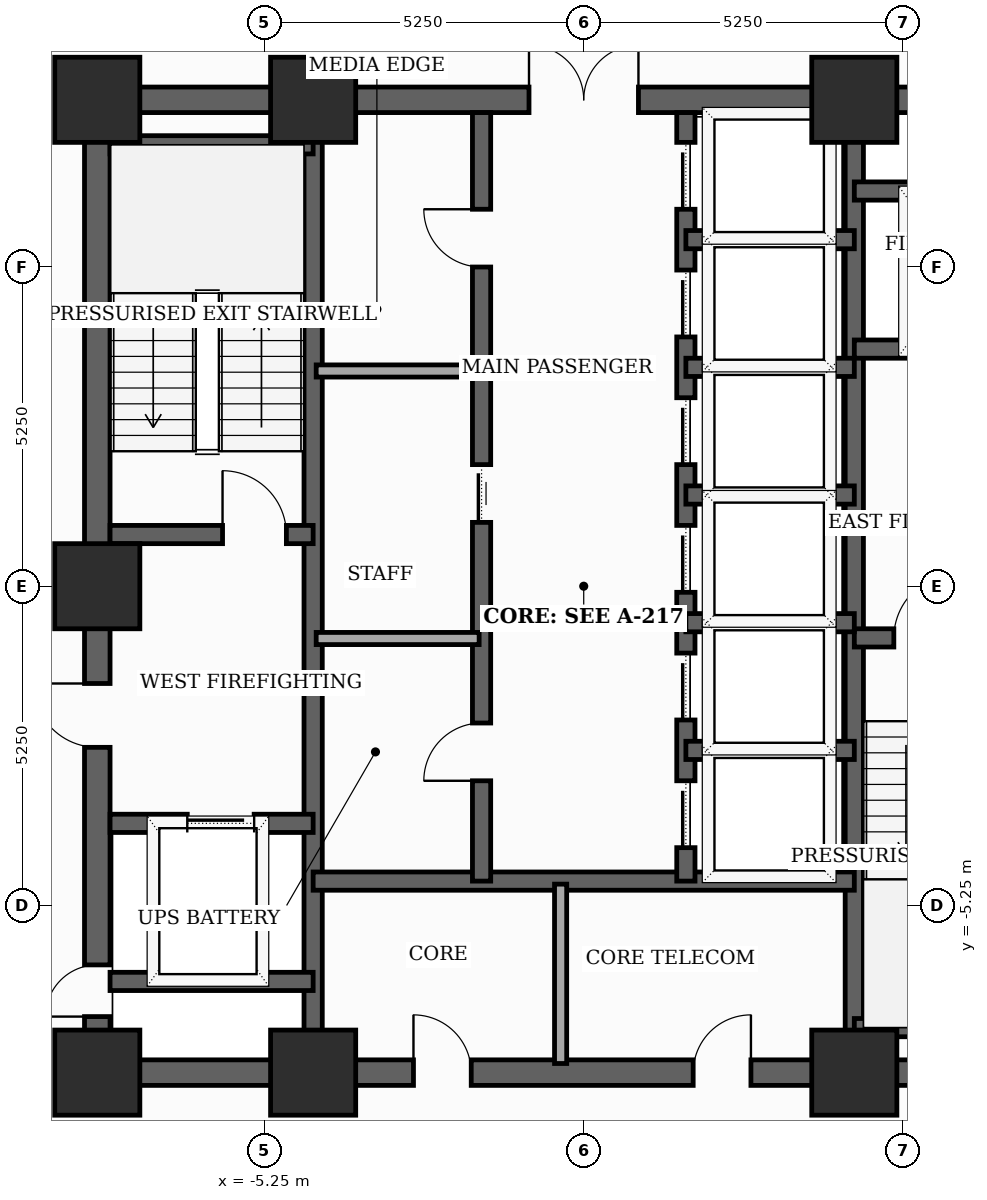
"""IFC4 building model, lengths in metres.
Left out: names, types, materials, properties, quantities, classifications, styles, units other than length and angle.
Written with IfcOpenShell. Run it as: python <this file> out.ifc"""

import sys

from ifc_helpers import new_model, si_unit, direction, frame, frame_2d, origin, origin_2d, place, context, subcontext, project, spatial, rectangle, extrude, element, fill, save


model = new_model("IFC4")
c1 = context("Model", 3, precision=1e-05, world=origin(), true_north=direction((0.0, 1.0)))
c2 = subcontext(c1, "Body", "Model", "MODEL_VIEW")
j1 = project(units=[si_unit("LENGTHUNIT", "METRE"), si_unit("PLANEANGLEUNIT", "RADIAN")], contexts=[c1])
p1 = place(None, origin())
s1 = spatial("IfcSite", under=j1, at=p1, CompositionType="ELEMENT")
p2 = place(p1, origin())
s2 = spatial("IfcBuilding", under=s1, at=p2, CompositionType="ELEMENT")
p3 = place(p2, frame((0.0, 0.0, 127.3)))
s3 = spatial("IfcBuildingStorey", under=s2, at=p3, CompositionType="ELEMENT", Elevation=127.3)
for number, where, z_axis, x_axis in (
    (1, (-8.0, -8.0, 0.0), (0.0, 0.0, 1.0), (1.0, 0.0, 0.0)),
    (2, (-4.45, -8.0, 0.0), (0.0, 0.0, 1.0), (1.0, 0.0, 0.0)),
    (3, (4.45, -8.0, 0.0), (0.0, 0.0, 1.0), (1.0, 0.0, 0.0)),
    (4, (4.45, 8.0, 0.0), (0.0, 0.0, 1.0), (1.0, 0.0, 0.0)),
    (5, (-4.45, 8.0, 0.0), (0.0, 0.0, 1.0), (1.0, 0.0, 0.0)),
    (6, (-8.0, 8.0, 0.0), (0.0, 0.0, 1.0), (1.0, 0.0, 0.0)),
    (7, (-8.0, 0.0, 0.0), (0.0, 0.0, 1.0), (1.0, 0.0, 0.0)),
):
    element("IfcColumn", number, at=place(p3, frame(where, z_axis=z_axis, x_axis=x_axis)), inside=s3, PredefinedType="COLUMN", context=c2, shape_type="SweptSolid", body=[
        extrude(rectangle(XDim=1.4, YDim=1.4, at=origin_2d()), origin(), (0.0, 0.0, 1.0), 3.7),
    ])
p4 = place(p3, frame((-8.0, -8.0, 0.0), z_axis=(0.0, 0.0, 1.0), x_axis=(0.0, 1.0, 0.0)))
e8 = element("IfcWall", 8, at=p4, inside=s3, PredefinedType="SHEAR", context=c2, shape_type="SweptSolid", body=[
    extrude(rectangle(XDim=16.0, YDim=0.42, at=frame_2d((8.0, 0.0))), origin(), (0.0, 0.0, 1.0), 3.5),
])
p5 = place(p4, frame((0.922, 0.0, 0.0)))
e9 = element("IfcOpeningElement", 9, at=p5, cuts=e8, PredefinedType="OPENING", context=c2, shape_type="SweptSolid", body=[
    extrude(rectangle(XDim=0.85, YDim=2.02, at=frame_2d((0.425, 1.01))), frame((0.0, 0.22, 0.0), z_axis=(0.0, -1.0, 0.0), x_axis=(1.0, 0.0, 0.0)), (0.0, 0.0, 1.0), 0.44),
])
p6 = place(p4, frame((5.35, 0.0, 0.0)))
e10 = element("IfcOpeningElement", 10, at=p6, cuts=e8, PredefinedType="OPENING", context=c2, shape_type="SweptSolid", body=[
    extrude(rectangle(XDim=1.05, YDim=2.15, at=frame_2d((0.525, 1.075))), frame((0.0, 0.22, 0.0), z_axis=(0.0, -1.0, 0.0), x_axis=(1.0, 0.0, 0.0)), (0.0, 0.0, 1.0), 0.44),
])
p7 = place(p3, frame((-8.0, -8.0, 0.0), z_axis=(0.0, 0.0, 1.0), x_axis=(1.0, 0.0, 0.0)))
e11 = element("IfcWall", 11, at=p7, inside=s3, PredefinedType="SHEAR", context=c2, shape_type="SweptSolid", body=[
    extrude(rectangle(XDim=16.0, YDim=0.42, at=frame_2d((8.0, 0.0))), origin(), (0.0, 0.0, 1.0), 3.5),
])
p8 = place(p7, frame((5.2, 0.0, 0.0)))
e12 = element("IfcOpeningElement", 12, at=p8, cuts=e11, PredefinedType="OPENING", context=c2, shape_type="SweptSolid", body=[
    extrude(rectangle(XDim=0.95, YDim=2.1, at=frame_2d((0.475, 1.05))), frame((0.0, 0.22, 0.0), z_axis=(0.0, -1.0, 0.0), x_axis=(1.0, 0.0, 0.0)), (0.0, 0.0, 1.0), 0.44),
])
p9 = place(p7, frame((9.8, 0.0, 0.0)))
e13 = element("IfcOpeningElement", 13, at=p9, cuts=e11, PredefinedType="OPENING", context=c2, shape_type="SweptSolid", body=[
    extrude(rectangle(XDim=0.95, YDim=2.1, at=frame_2d((0.475, 1.05))), frame((0.0, 0.22, 0.0), z_axis=(0.0, -1.0, 0.0), x_axis=(1.0, 0.0, 0.0)), (0.0, 0.0, 1.0), 0.44),
])
p10 = place(p3, frame((-8.0, 8.0, 0.0), z_axis=(0.0, 0.0, 1.0), x_axis=(1.0, 0.0, 0.0)))
e14 = element("IfcWall", 14, at=p10, inside=s3, PredefinedType="SHEAR", context=c2, shape_type="SweptSolid", body=[
    extrude(rectangle(XDim=16.0, YDim=0.42, at=frame_2d((8.0, 0.0))), origin(), (0.0, 0.0, 1.0), 3.5),
])
p11 = place(p10, frame((7.1, 0.0, 0.0)))
e15 = element("IfcOpeningElement", 15, at=p11, cuts=e14, PredefinedType="OPENING", context=c2, shape_type="SweptSolid", body=[
    extrude(rectangle(XDim=1.8, YDim=2.15, at=frame_2d((0.9, 1.075))), frame((0.0, 0.22, 0.0), z_axis=(0.0, -1.0, 0.0), x_axis=(1.0, 0.0, 0.0)), (0.0, 0.0, 1.0), 0.44),
])
for number, where, z_axis, x_axis in (
    (16, (-4.45, -7.79, 0.0), (0.0, 0.0, 1.0), (0.0, 1.0, 0.0)),
    (17, (4.45, -7.79, 0.0), (0.0, 0.0, 1.0), (0.0, 1.0, 0.0)),
):
    element("IfcWall", number, at=place(p3, frame(where, z_axis=z_axis, x_axis=x_axis)), inside=s3, PredefinedType="SHEAR", context=c2, shape_type="SweptSolid", body=[
        extrude(rectangle(XDim=15.58, YDim=0.3, at=frame_2d((7.79, 0.0))), origin(), (0.0, 0.0, 1.0), 3.5),
    ])
p12 = place(p3, frame((-7.79, 0.85, 0.0), z_axis=(0.0, 0.0, 1.0), x_axis=(1.0, 0.0, 0.0)))
e18 = element("IfcWall", 18, at=p12, inside=s3, PredefinedType="SHEAR", context=c2, shape_type="SweptSolid", body=[
    extrude(rectangle(XDim=3.34, YDim=0.3, at=frame_2d((1.67, 0.0))), origin(), (0.0, 0.0, 1.0), 3.5),
])
p13 = place(p12, frame((1.85, 0.0, 0.0)))
e19 = element("IfcOpeningElement", 19, at=p13, cuts=e18, PredefinedType="OPENING", context=c2, shape_type="SweptSolid", body=[
    extrude(rectangle(XDim=1.05, YDim=2.15, at=frame_2d((0.525, 1.075))), frame((0.0, 0.16, 0.0), z_axis=(0.0, -1.0, 0.0), x_axis=(1.0, 0.0, 0.0)), (0.0, 0.0, 1.0), 0.32),
])
p14 = place(p3, frame((-7.79, 7.26, 0.0), z_axis=(0.0, 0.0, 1.0), x_axis=(1.0, 0.0, 0.0)))
e20 = element("IfcWall", 20, at=p14, inside=s3, PredefinedType="SHEAR", context=c2, shape_type="SweptSolid", body=[
    extrude(rectangle(XDim=3.34, YDim=0.3, at=frame_2d((1.67, 0.0))), origin(), (0.0, 0.0, 1.0), 3.5),
])
p15 = place(p3, frame((4.45, -0.85, 0.0), z_axis=(0.0, 0.0, 1.0), x_axis=(1.0, 0.0, 0.0)))
e21 = element("IfcWall", 21, at=p15, inside=s3, PredefinedType="SHEAR", context=c2, shape_type="SweptSolid", body=[
    extrude(rectangle(XDim=3.34, YDim=0.3, at=frame_2d((1.67, 0.0))), origin(), (0.0, 0.0, 1.0), 3.5),
])
p16 = place(p15, frame((0.65, 0.0, 0.0)))
e22 = element("IfcOpeningElement", 22, at=p16, cuts=e21, PredefinedType="OPENING", context=c2, shape_type="SweptSolid", body=[
    extrude(rectangle(XDim=1.05, YDim=2.15, at=frame_2d((0.525, 1.075))), frame((0.0, 0.16, 0.0), z_axis=(0.0, -1.0, 0.0), x_axis=(1.0, 0.0, 0.0)), (0.0, 0.0, 1.0), 0.32),
])
p17 = place(p3, frame((4.45, -7.26, 0.0), z_axis=(0.0, 0.0, 1.0), x_axis=(1.0, 0.0, 0.0)))
e23 = element("IfcWall", 23, at=p17, inside=s3, PredefinedType="SHEAR", context=c2, shape_type="SweptSolid", body=[
    extrude(rectangle(XDim=3.55, YDim=0.3, at=frame_2d((1.775, 0.0))), origin(), (0.0, 0.0, 1.0), 3.5),
])
p18 = place(p3, frame((-7.79, -3.9, 0.0), z_axis=(0.0, 0.0, 1.0), x_axis=(1.0, 0.0, 0.0)))
e24 = element("IfcWall", 24, at=p18, inside=s3, PredefinedType="SHEAR", context=c2, shape_type="SweptSolid", body=[
    extrude(rectangle(XDim=3.34, YDim=0.3, at=frame_2d((1.67, 0.0))), origin(), (0.0, 0.0, 1.0), 3.5),
])
p19 = place(p18, frame((1.27, 0.0, 0.0)))
e25 = element("IfcOpeningElement", 25, at=p19, cuts=e24, PredefinedType="OPENING", context=c2, shape_type="SweptSolid", body=[
    extrude(rectangle(XDim=1.1, YDim=2.1, at=frame_2d((0.55, 1.05))), frame((0.0, 0.16, 0.0), z_axis=(0.0, -1.0, 0.0), x_axis=(1.0, 0.0, 0.0)), (0.0, 0.0, 1.0), 0.32),
])
p20 = place(p3, frame((-7.79, -6.5, 0.0), z_axis=(0.0, 0.0, 1.0), x_axis=(1.0, 0.0, 0.0)))
e26 = element("IfcWall", 26, at=p20, inside=s3, PredefinedType="SHEAR", context=c2, shape_type="SweptSolid", body=[
    extrude(rectangle(XDim=3.34, YDim=0.3, at=frame_2d((1.67, 0.0))), origin(), (0.0, 0.0, 1.0), 3.5),
])
p21 = place(p3, frame((4.45, 3.9, 0.0), z_axis=(0.0, 0.0, 1.0), x_axis=(1.0, 0.0, 0.0)))
e27 = element("IfcWall", 27, at=p21, inside=s3, PredefinedType="SHEAR", context=c2, shape_type="SweptSolid", body=[
    extrude(rectangle(XDim=3.34, YDim=0.3, at=frame_2d((1.67, 0.0))), origin(), (0.0, 0.0, 1.0), 3.5),
])
p22 = place(p21, frame((1.18, 0.0, 0.0)))
e28 = element("IfcOpeningElement", 28, at=p22, cuts=e27, PredefinedType="OPENING", context=c2, shape_type="SweptSolid", body=[
    extrude(rectangle(XDim=1.1, YDim=2.1, at=frame_2d((0.55, 1.05))), frame((0.0, 0.16, 0.0), z_axis=(0.0, -1.0, 0.0), x_axis=(1.0, 0.0, 0.0)), (0.0, 0.0, 1.0), 0.32),
])
p23 = place(p3, frame((4.45, 6.5, 0.0), z_axis=(0.0, 0.0, 1.0), x_axis=(1.0, 0.0, 0.0)))
e29 = element("IfcWall", 29, at=p23, inside=s3, PredefinedType="SHEAR", context=c2, shape_type="SweptSolid", body=[
    extrude(rectangle(XDim=3.34, YDim=0.3, at=frame_2d((1.67, 0.0))), origin(), (0.0, 0.0, 1.0), 3.5),
])
p24 = place(p3, frame((-4.45, -4.85, 0.0), z_axis=(0.0, 0.0, 1.0), x_axis=(1.0, 0.0, 0.0)))
e30 = element("IfcWall", 30, at=p24, inside=s3, PredefinedType="SHEAR", context=c2, shape_type="SweptSolid", body=[
    extrude(rectangle(XDim=8.9, YDim=0.3, at=frame_2d((4.45, 0.0))), origin(), (0.0, 0.0, 1.0), 3.5),
])
p25 = place(p3, frame((-1.68, -4.85, 0.0), z_axis=(0.0, 0.0, 1.0), x_axis=(0.0, 1.0, 0.0)))
e31 = element("IfcWall", 31, at=p25, inside=s3, PredefinedType="SHEAR", context=c2, shape_type="SweptSolid", body=[
    extrude(rectangle(XDim=12.64, YDim=0.3, at=frame_2d((6.32, 0.0))), origin(), (0.0, 0.0, 1.0), 3.5),
])
p26 = place(p25, frame((1.65, 0.0, 0.0)))
e32 = element("IfcOpeningElement", 32, at=p26, cuts=e31, PredefinedType="OPENING", context=c2, shape_type="SweptSolid", body=[
    extrude(rectangle(XDim=0.95, YDim=2.1, at=frame_2d((0.475, 1.05))), frame((0.0, 0.16, 0.0), z_axis=(0.0, -1.0, 0.0), x_axis=(1.0, 0.0, 0.0)), (0.0, 0.0, 1.0), 0.32),
])
p27 = place(p25, frame((5.9, 0.0, 0.0)))
e33 = element("IfcOpeningElement", 33, at=p27, cuts=e31, PredefinedType="OPENING", context=c2, shape_type="SweptSolid", body=[
    extrude(rectangle(XDim=0.95, YDim=2.1, at=frame_2d((0.475, 1.05))), frame((0.0, 0.16, 0.0), z_axis=(0.0, -1.0, 0.0), x_axis=(1.0, 0.0, 0.0)), (0.0, 0.0, 1.0), 0.32),
])
p28 = place(p25, frame((10.1, 0.0, 0.0)))
e34 = element("IfcOpeningElement", 34, at=p28, cuts=e31, PredefinedType="OPENING", context=c2, shape_type="SweptSolid", body=[
    extrude(rectangle(XDim=0.95, YDim=2.1, at=frame_2d((0.475, 1.05))), frame((0.0, 0.16, 0.0), z_axis=(0.0, -1.0, 0.0), x_axis=(1.0, 0.0, 0.0)), (0.0, 0.0, 1.0), 0.32),
])
p29 = place(p3, frame((1.68, -4.85, 0.0), z_axis=(0.0, 0.0, 1.0), x_axis=(0.0, 1.0, 0.0)))
e35 = element("IfcWall", 35, at=p29, inside=s3, PredefinedType="SHEAR", context=c2, shape_type="SweptSolid", body=[
    extrude(rectangle(XDim=12.64, YDim=0.3, at=frame_2d((6.32, 0.0))), origin(), (0.0, 0.0, 1.0), 3.5),
])
p30 = place(p29, frame((0.55, 0.0, 0.0)))
e36 = element("IfcOpeningElement", 36, at=p30, cuts=e35, PredefinedType="OPENING", context=c2, shape_type="SweptSolid", body=[
    extrude(rectangle(XDim=1.1, YDim=2.1, at=frame_2d((0.55, 1.05))), frame((0.0, 0.16, 0.0), z_axis=(0.0, -1.0, 0.0), x_axis=(1.0, 0.0, 0.0)), (0.0, 0.0, 1.0), 0.32),
])
p31 = place(p29, frame((2.65, 0.0, 0.0)))
e37 = element("IfcOpeningElement", 37, at=p31, cuts=e35, PredefinedType="OPENING", context=c2, shape_type="SweptSolid", body=[
    extrude(rectangle(XDim=1.1, YDim=2.1, at=frame_2d((0.55, 1.05))), frame((0.0, 0.16, 0.0), z_axis=(0.0, -1.0, 0.0), x_axis=(1.0, 0.0, 0.0)), (0.0, 0.0, 1.0), 0.32),
])
p32 = place(p29, frame((4.75, 0.0, 0.0)))
e38 = element("IfcOpeningElement", 38, at=p32, cuts=e35, PredefinedType="OPENING", context=c2, shape_type="SweptSolid", body=[
    extrude(rectangle(XDim=1.1, YDim=2.1, at=frame_2d((0.55, 1.05))), frame((0.0, 0.16, 0.0), z_axis=(0.0, -1.0, 0.0), x_axis=(1.0, 0.0, 0.0)), (0.0, 0.0, 1.0), 0.32),
])
p33 = place(p29, frame((6.85, 0.0, 0.0)))
e39 = element("IfcOpeningElement", 39, at=p33, cuts=e35, PredefinedType="OPENING", context=c2, shape_type="SweptSolid", body=[
    extrude(rectangle(XDim=1.1, YDim=2.1, at=frame_2d((0.55, 1.05))), frame((0.0, 0.16, 0.0), z_axis=(0.0, -1.0, 0.0), x_axis=(1.0, 0.0, 0.0)), (0.0, 0.0, 1.0), 0.32),
])
p34 = place(p29, frame((8.95, 0.0, 0.0)))
e40 = element("IfcOpeningElement", 40, at=p34, cuts=e35, PredefinedType="OPENING", context=c2, shape_type="SweptSolid", body=[
    extrude(rectangle(XDim=1.1, YDim=2.1, at=frame_2d((0.55, 1.05))), frame((0.0, 0.16, 0.0), z_axis=(0.0, -1.0, 0.0), x_axis=(1.0, 0.0, 0.0)), (0.0, 0.0, 1.0), 0.32),
])
p35 = place(p29, frame((11.05, 0.0, 0.0)))
e41 = element("IfcOpeningElement", 41, at=p35, cuts=e35, PredefinedType="OPENING", context=c2, shape_type="SweptSolid", body=[
    extrude(rectangle(XDim=1.1, YDim=2.1, at=frame_2d((0.55, 1.05))), frame((0.0, 0.16, 0.0), z_axis=(0.0, -1.0, 0.0), x_axis=(1.0, 0.0, 0.0)), (0.0, 0.0, 1.0), 0.32),
])
for number, where, z_axis, x_axis in (
    (42, (1.68, 1.5, 0.0), (0.0, 0.0, 1.0), (1.0, 0.0, 0.0)),
    (43, (1.68, 3.6, 0.0), (0.0, 0.0, 1.0), (1.0, 0.0, 0.0)),
    (44, (1.68, 5.7, 0.0), (0.0, 0.0, 1.0), (1.0, 0.0, 0.0)),
    (45, (1.68, -2.7, 0.0), (0.0, 0.0, 1.0), (1.0, 0.0, 0.0)),
    (46, (1.68, -0.6, 0.0), (0.0, 0.0, 1.0), (1.0, 0.0, 0.0)),
):
    element("IfcWall", number, at=place(p3, frame(where, z_axis=z_axis, x_axis=x_axis)), inside=s3, PredefinedType="SHEAR", context=c2, shape_type="SweptSolid", body=[
        extrude(rectangle(XDim=2.77, YDim=0.3, at=frame_2d((1.385, 0.0))), origin(), (0.0, 0.0, 1.0), 3.5),
    ])
p36 = place(p3, frame((-0.38, -7.85, 0.0), z_axis=(0.0, 0.0, 1.0), x_axis=(0.0, 1.0, 0.0)))
e47 = element("IfcWall", 47, at=p36, inside=s3, PredefinedType="SOLIDWALL", context=c2, shape_type="SweptSolid", body=[
    extrude(rectangle(XDim=2.95, YDim=0.2, at=frame_2d((1.475, 0.0))), origin(), (0.0, 0.0, 1.0), 2.885),
])
for number, where, z_axis, x_axis in (
    (48, (-4.4, -0.86, 0.0), (0.0, 0.0, 1.0), (1.0, 0.0, 0.0)),
    (49, (-4.4, 3.54, 0.0), (0.0, 0.0, 1.0), (1.0, 0.0, 0.0)),
):
    element("IfcWall", number, at=place(p3, frame(where, z_axis=z_axis, x_axis=x_axis)), inside=s3, PredefinedType="SOLIDWALL", context=c2, shape_type="SweptSolid", body=[
        extrude(rectangle(XDim=2.68, YDim=0.2, at=frame_2d((1.34, 0.0))), origin(), (0.0, 0.0, 1.0), 3.5),
    ])
p37 = place(p5, origin())
e50 = element("IfcDoor", 50, at=p37, inside=s3, OperationType="SINGLE_SWING_LEFT", PredefinedType="TRAPDOOR", context=c2, shape_type="SweptSolid", body=[
    extrude(rectangle(XDim=0.85, YDim=2.02, at=frame_2d((0.425, 1.01))), frame((0.0, 0.025, 0.0), z_axis=(0.0, -1.0, 0.0), x_axis=(1.0, 0.0, 0.0)), (0.0, 0.0, 1.0), 0.05),
])
fill(e9, e50)
p38 = place(p6, origin())
e51 = element("IfcDoor", 51, at=p38, inside=s3, OperationType="SINGLE_SWING_RIGHT", PredefinedType="DOOR", context=c2, shape_type="SweptSolid", body=[
    extrude(rectangle(XDim=1.05, YDim=2.15, at=frame_2d((0.525, 1.075))), frame((0.0, 0.025, 0.0), z_axis=(0.0, -1.0, 0.0), x_axis=(1.0, 0.0, 0.0)), (0.0, 0.0, 1.0), 0.05),
])
fill(e10, e51)
p39 = place(p8, origin())
e52 = element("IfcDoor", 52, at=p39, inside=s3, OperationType="SINGLE_SWING_LEFT", PredefinedType="DOOR", context=c2, shape_type="SweptSolid", body=[
    extrude(rectangle(XDim=0.95, YDim=2.1, at=frame_2d((0.475, 1.05))), frame((0.0, 0.025, 0.0), z_axis=(0.0, -1.0, 0.0), x_axis=(1.0, 0.0, 0.0)), (0.0, 0.0, 1.0), 0.05),
])
fill(e12, e52)
p40 = place(p9, origin())
e53 = element("IfcDoor", 53, at=p40, inside=s3, OperationType="SINGLE_SWING_RIGHT", PredefinedType="DOOR", context=c2, shape_type="SweptSolid", body=[
    extrude(rectangle(XDim=0.95, YDim=2.1, at=frame_2d((0.475, 1.05))), frame((0.0, 0.025, 0.0), z_axis=(0.0, -1.0, 0.0), x_axis=(1.0, 0.0, 0.0)), (0.0, 0.0, 1.0), 0.05),
])
fill(e13, e53)
p41 = place(p11, origin())
e54 = element("IfcDoor", 54, at=p41, inside=s3, OperationType="DOUBLE_DOOR_SINGLE_SWING", PredefinedType="DOOR", context=c2, shape_type="SweptSolid", body=[
    extrude(rectangle(XDim=1.8, YDim=2.15, at=frame_2d((0.9, 1.075))), frame((0.0, 0.025, 0.0), z_axis=(0.0, -1.0, 0.0), x_axis=(1.0, 0.0, 0.0)), (0.0, 0.0, 1.0), 0.05),
])
fill(e15, e54)
p42 = place(p13, origin())
e55 = element("IfcDoor", 55, at=p42, inside=s3, OperationType="SINGLE_SWING_LEFT", PredefinedType="DOOR", context=c2, shape_type="SweptSolid", body=[
    extrude(rectangle(XDim=1.05, YDim=2.15, at=frame_2d((0.525, 1.075))), frame((0.0, 0.025, 0.0), z_axis=(0.0, -1.0, 0.0), x_axis=(1.0, 0.0, 0.0)), (0.0, 0.0, 1.0), 0.05),
])
fill(e19, e55)
p43 = place(p16, origin())
e56 = element("IfcDoor", 56, at=p43, inside=s3, OperationType="SINGLE_SWING_RIGHT", PredefinedType="DOOR", context=c2, shape_type="SweptSolid", body=[
    extrude(rectangle(XDim=1.05, YDim=2.15, at=frame_2d((0.525, 1.075))), frame((0.0, 0.025, 0.0), z_axis=(0.0, -1.0, 0.0), x_axis=(1.0, 0.0, 0.0)), (0.0, 0.0, 1.0), 0.05),
])
fill(e22, e56)
p44 = place(p19, origin())
e57 = element("IfcDoor", 57, at=p44, inside=s3, OperationType="SLIDING_TO_LEFT", PredefinedType="DOOR", context=c2, shape_type="SweptSolid", body=[
    extrude(rectangle(XDim=1.1, YDim=2.1, at=frame_2d((0.55, 1.05))), frame((0.0, 0.025, 0.0), z_axis=(0.0, -1.0, 0.0), x_axis=(1.0, 0.0, 0.0)), (0.0, 0.0, 1.0), 0.05),
])
fill(e25, e57)
p45 = place(p26, origin())
e58 = element("IfcDoor", 58, at=p45, inside=s3, OperationType="SINGLE_SWING_LEFT", PredefinedType="DOOR", context=c2, shape_type="SweptSolid", body=[
    extrude(rectangle(XDim=0.95, YDim=2.1, at=frame_2d((0.475, 1.05))), frame((0.0, 0.025, 0.0), z_axis=(0.0, -1.0, 0.0), x_axis=(1.0, 0.0, 0.0)), (0.0, 0.0, 1.0), 0.05),
])
fill(e32, e58)
p46 = place(p27, origin())
e59 = element("IfcDoor", 59, at=p46, inside=s3, OperationType="SLIDING_TO_LEFT", PredefinedType="DOOR", context=c2, shape_type="SweptSolid", body=[
    extrude(rectangle(XDim=0.95, YDim=2.1, at=frame_2d((0.475, 1.05))), frame((0.0, 0.025, 0.0), z_axis=(0.0, -1.0, 0.0), x_axis=(1.0, 0.0, 0.0)), (0.0, 0.0, 1.0), 0.05),
])
fill(e33, e59)
p47 = place(p28, origin())
e60 = element("IfcDoor", 60, at=p47, inside=s3, OperationType="SINGLE_SWING_RIGHT", PredefinedType="DOOR", context=c2, shape_type="SweptSolid", body=[
    extrude(rectangle(XDim=0.95, YDim=2.1, at=frame_2d((0.475, 1.05))), frame((0.0, 0.025, 0.0), z_axis=(0.0, -1.0, 0.0), x_axis=(1.0, 0.0, 0.0)), (0.0, 0.0, 1.0), 0.05),
])
fill(e34, e60)
p48 = place(p30, origin())
e61 = element("IfcDoor", 61, at=p48, inside=s3, OperationType="SLIDING_TO_LEFT", PredefinedType="DOOR", context=c2, shape_type="SweptSolid", body=[
    extrude(rectangle(XDim=1.1, YDim=2.1, at=frame_2d((0.55, 1.05))), frame((0.0, 0.025, 0.0), z_axis=(0.0, -1.0, 0.0), x_axis=(1.0, 0.0, 0.0)), (0.0, 0.0, 1.0), 0.05),
])
fill(e36, e61)
p49 = place(p31, origin())
e62 = element("IfcDoor", 62, at=p49, inside=s3, OperationType="SLIDING_TO_LEFT", PredefinedType="DOOR", context=c2, shape_type="SweptSolid", body=[
    extrude(rectangle(XDim=1.1, YDim=2.1, at=frame_2d((0.55, 1.05))), frame((0.0, 0.025, 0.0), z_axis=(0.0, -1.0, 0.0), x_axis=(1.0, 0.0, 0.0)), (0.0, 0.0, 1.0), 0.05),
])
fill(e37, e62)
p50 = place(p32, origin())
e63 = element("IfcDoor", 63, at=p50, inside=s3, OperationType="SLIDING_TO_LEFT", PredefinedType="DOOR", context=c2, shape_type="SweptSolid", body=[
    extrude(rectangle(XDim=1.1, YDim=2.1, at=frame_2d((0.55, 1.05))), frame((0.0, 0.025, 0.0), z_axis=(0.0, -1.0, 0.0), x_axis=(1.0, 0.0, 0.0)), (0.0, 0.0, 1.0), 0.05),
])
fill(e38, e63)
p51 = place(p33, origin())
e64 = element("IfcDoor", 64, at=p51, inside=s3, OperationType="SLIDING_TO_LEFT", PredefinedType="DOOR", context=c2, shape_type="SweptSolid", body=[
    extrude(rectangle(XDim=1.1, YDim=2.1, at=frame_2d((0.55, 1.05))), frame((0.0, 0.025, 0.0), z_axis=(0.0, -1.0, 0.0), x_axis=(1.0, 0.0, 0.0)), (0.0, 0.0, 1.0), 0.05),
])
fill(e39, e64)
p52 = place(p34, origin())
e65 = element("IfcDoor", 65, at=p52, inside=s3, OperationType="SLIDING_TO_LEFT", PredefinedType="DOOR", context=c2, shape_type="SweptSolid", body=[
    extrude(rectangle(XDim=1.1, YDim=2.1, at=frame_2d((0.55, 1.05))), frame((0.0, 0.025, 0.0), z_axis=(0.0, -1.0, 0.0), x_axis=(1.0, 0.0, 0.0)), (0.0, 0.0, 1.0), 0.05),
])
fill(e40, e65)
p53 = place(p35, origin())
e66 = element("IfcDoor", 66, at=p53, inside=s3, OperationType="SLIDING_TO_LEFT", PredefinedType="DOOR", context=c2, shape_type="SweptSolid", body=[
    extrude(rectangle(XDim=1.1, YDim=2.1, at=frame_2d((0.55, 1.05))), frame((0.0, 0.025, 0.0), z_axis=(0.0, -1.0, 0.0), x_axis=(1.0, 0.0, 0.0)), (0.0, 0.0, 1.0), 0.05),
])
fill(e41, e66)
save(model, sys.argv[1])
